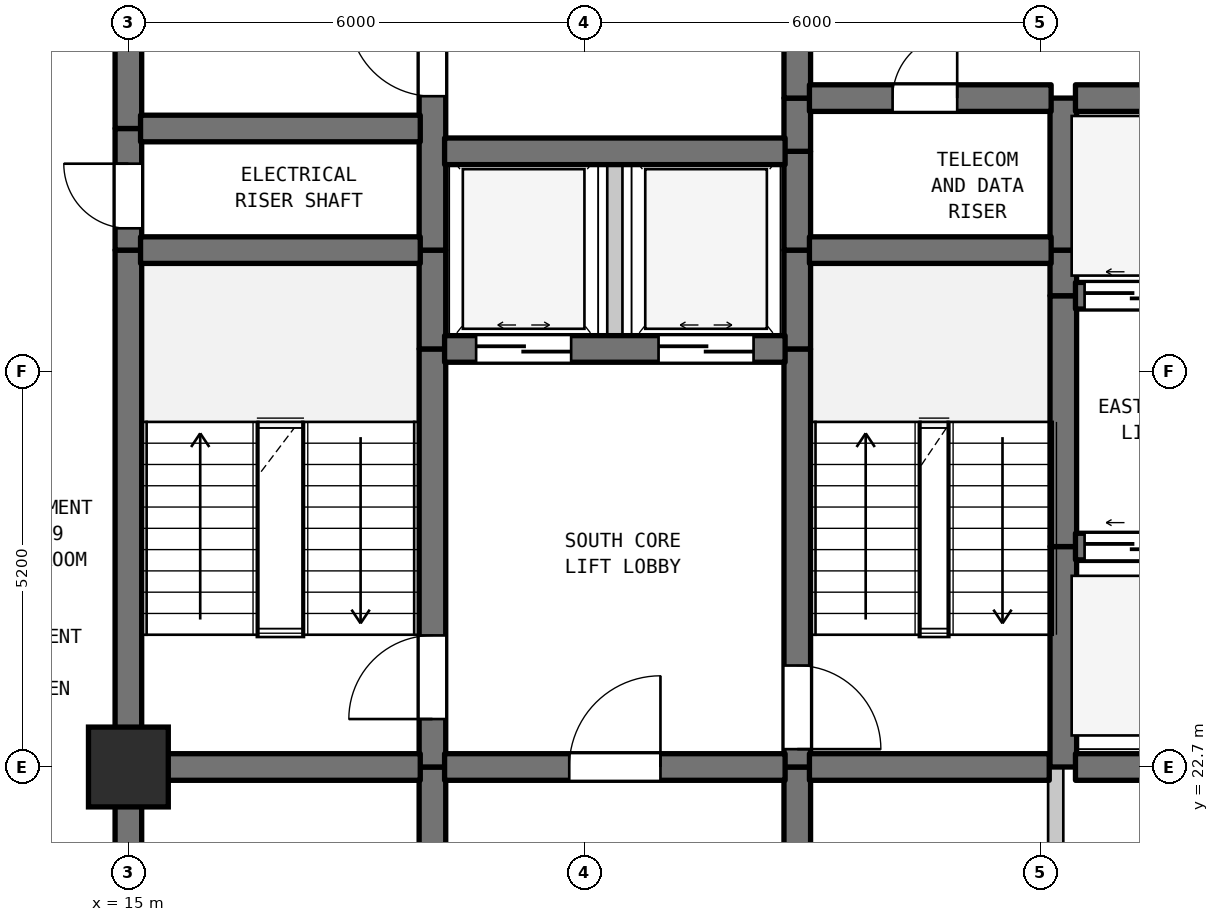
"""IFC4 building model, lengths in metres.
Left out: names, types, materials, properties, quantities, classifications, styles, units other than length and angle.
Written with IfcOpenShell. Run it as: python <this file> out.ifc"""

import sys

from ifc_helpers import new_model, si_unit, direction, frame, frame_2d, origin, origin_2d, place, context, subcontext, project, spatial, rectangle, extrude, element, fill, save


model = new_model("IFC4")
c1 = context("Model", 3, precision=1e-05, world=origin(), true_north=direction((0.0, 1.0)))
c2 = subcontext(c1, "Body", "Model", "MODEL_VIEW")
j1 = project(units=[si_unit("LENGTHUNIT", "METRE"), si_unit("PLANEANGLEUNIT", "RADIAN")], contexts=[c1])
p1 = place(None, origin())
s1 = spatial("IfcSite", under=j1, at=p1, CompositionType="ELEMENT")
p2 = place(p1, origin())
s2 = spatial("IfcBuilding", under=s1, at=p2, CompositionType="ELEMENT")
p3 = place(p2, frame((0.0, 0.0, 113.1)))
s3 = spatial("IfcBuildingStorey", under=s2, at=p3, CompositionType="ELEMENT", Elevation=113.1)
p4 = place(p3, frame((15.0, 22.7, 0.0), z_axis=(0.0, 0.0, 1.0), x_axis=(1.0, 0.0, 0.0)))
e1 = element("IfcColumn", 1, at=p4, inside=s3, PredefinedType="COLUMN", context=c2, shape_type="SweptSolid", body=[
    extrude(rectangle(XDim=1.05, YDim=1.05, at=origin_2d()), origin(), (0.0, 0.0, 1.0), 3.7),
])
p5 = place(p3, frame((15.0, 19.5, 0.0), z_axis=(0.0, 0.0, 1.0), x_axis=(0.0, 1.0, 0.0)))
e2 = element("IfcWall", 2, at=p5, inside=s3, PredefinedType="SHEAR", context=c2, shape_type="SweptSolid", body=[
    extrude(rectangle(XDim=3.2, YDim=0.35, at=frame_2d((1.6, 0.0))), origin(), (0.0, 0.0, 1.0), 3.385),
])
p6 = place(p3, frame((15.0, 22.7, 0.0), z_axis=(0.0, 0.0, 1.0), x_axis=(0.0, 1.0, 0.0)))
e3 = element("IfcWall", 3, at=p6, inside=s3, PredefinedType="SHEAR", context=c2, shape_type="SweptSolid", body=[
    extrude(rectangle(XDim=6.8, YDim=0.35, at=frame_2d((3.4, 0.0))), origin(), (0.0, 0.0, 1.0), 3.385),
])
p7 = place(p3, frame((15.0, 29.5, 0.0), z_axis=(0.0, 0.0, 1.0), x_axis=(0.0, 1.0, 0.0)))
e4 = element("IfcWall", 4, at=p7, inside=s3, PredefinedType="SHEAR", context=c2, shape_type="SweptSolid", body=[
    extrude(rectangle(XDim=1.6, YDim=0.35, at=frame_2d((0.8, 0.0))), origin(), (0.0, 0.0, 1.0), 3.385),
])
p8 = place(p7, frame((0.287, 0.0, 0.0)))
e5 = element("IfcOpeningElement", 5, at=p8, cuts=e4, PredefinedType="OPENING", context=c2, shape_type="SweptSolid", body=[
    extrude(rectangle(XDim=0.85, YDim=2.1, at=frame_2d((0.425, 1.05))), frame((0.0, 0.185, 0.0), z_axis=(0.0, -1.0, 0.0), x_axis=(1.0, 0.0, 0.0)), (0.0, 0.0, 1.0), 0.37),
])
p9 = place(p3, frame((15.0, 31.1, 0.0), z_axis=(0.0, 0.0, 1.0), x_axis=(0.0, 1.0, 0.0)))
e6 = element("IfcWall", 6, at=p9, inside=s3, PredefinedType="SHEAR", context=c2, shape_type="SweptSolid", body=[
    extrude(rectangle(XDim=6.8, YDim=0.35, at=frame_2d((3.4, 0.0))), origin(), (0.0, 0.0, 1.0), 3.385),
])
p10 = place(p3, frame((19.0, 19.5, 0.0), z_axis=(0.0, 0.0, 1.0), x_axis=(0.0, 1.0, 0.0)))
e7 = element("IfcWall", 7, at=p10, inside=s3, PredefinedType="SHEAR", context=c2, shape_type="SweptSolid", body=[
    extrude(rectangle(XDim=3.2, YDim=0.35, at=frame_2d((1.6, 0.0))), origin(), (0.0, 0.0, 1.0), 3.385),
])
p11 = place(p3, frame((19.0, 22.7, 0.0), z_axis=(0.0, 0.0, 1.0), x_axis=(0.0, 1.0, 0.0)))
e8 = element("IfcWall", 8, at=p11, inside=s3, PredefinedType="SHEAR", context=c2, shape_type="SweptSolid", body=[
    extrude(rectangle(XDim=5.5, YDim=0.35, at=frame_2d((2.75, 0.0))), origin(), (0.0, 0.0, 1.0), 3.385),
])
p12 = place(p11, frame((0.631, 0.0, 0.0)))
e9 = element("IfcOpeningElement", 9, at=p12, cuts=e8, PredefinedType="OPENING", context=c2, shape_type="SweptSolid", body=[
    extrude(rectangle(XDim=1.1, YDim=2.15, at=frame_2d((0.55, 1.075))), frame((0.0, 0.185, 0.0), z_axis=(0.0, -1.0, 0.0), x_axis=(1.0, 0.0, 0.0)), (0.0, 0.0, 1.0), 0.37),
])
p13 = place(p3, frame((19.0, 28.2, 0.0), z_axis=(0.0, 0.0, 1.0), x_axis=(0.0, 1.0, 0.0)))
e10 = element("IfcWall", 10, at=p13, inside=s3, PredefinedType="SHEAR", context=c2, shape_type="SweptSolid", body=[
    extrude(rectangle(XDim=1.3, YDim=0.35, at=frame_2d((0.65, 0.0))), origin(), (0.0, 0.0, 1.0), 3.385),
])
p14 = place(p3, frame((19.0, 29.5, 0.0), z_axis=(0.0, 0.0, 1.0), x_axis=(0.0, 1.0, 0.0)))
e11 = element("IfcWall", 11, at=p14, inside=s3, PredefinedType="SHEAR", context=c2, shape_type="SweptSolid", body=[
    extrude(rectangle(XDim=5.5, YDim=0.35, at=frame_2d((2.75, 0.0))), origin(), (0.0, 0.0, 1.0), 3.385),
])
p15 = place(p14, frame((2.025, 0.0, 0.0)))
e12 = element("IfcOpeningElement", 12, at=p15, cuts=e11, PredefinedType="OPENING", context=c2, shape_type="SweptSolid", body=[
    extrude(rectangle(XDim=1.1, YDim=2.15, at=frame_2d((0.55, 1.075))), frame((0.0, 0.185, 0.0), z_axis=(0.0, -1.0, 0.0), x_axis=(1.0, 0.0, 0.0)), (0.0, 0.0, 1.0), 0.37),
])
p16 = place(p3, frame((21.4, 28.2, 0.0), z_axis=(0.0, 0.0, 1.0), x_axis=(0.0, 1.0, 0.0)))
e13 = element("IfcWall", 13, at=p16, inside=s3, PredefinedType="STANDARD", context=c2, shape_type="SweptSolid", body=[
    extrude(rectangle(XDim=2.6, YDim=0.2, at=frame_2d((1.3, 0.0))), origin(), (0.0, 0.0, 1.0), 3.385),
])
p17 = place(p3, frame((23.8, 19.5, 0.0), z_axis=(0.0, 0.0, 1.0), x_axis=(0.0, 1.0, 0.0)))
e14 = element("IfcWall", 14, at=p17, inside=s3, PredefinedType="SHEAR", context=c2, shape_type="SweptSolid", body=[
    extrude(rectangle(XDim=3.2, YDim=0.35, at=frame_2d((1.6, 0.0))), origin(), (0.0, 0.0, 1.0), 3.385),
])
p18 = place(p3, frame((23.8, 22.7, 0.0), z_axis=(0.0, 0.0, 1.0), x_axis=(0.0, 1.0, 0.0)))
e15 = element("IfcWall", 15, at=p18, inside=s3, PredefinedType="SHEAR", context=c2, shape_type="SweptSolid", body=[
    extrude(rectangle(XDim=5.5, YDim=0.35, at=frame_2d((2.75, 0.0))), origin(), (0.0, 0.0, 1.0), 3.385),
])
p19 = place(p18, frame((0.235, 0.0, 0.0)))
e16 = element("IfcOpeningElement", 16, at=p19, cuts=e15, PredefinedType="OPENING", context=c2, shape_type="SweptSolid", body=[
    extrude(rectangle(XDim=1.1, YDim=2.15, at=frame_2d((0.55, 1.075))), frame((0.0, 0.185, 0.0), z_axis=(0.0, -1.0, 0.0), x_axis=(1.0, 0.0, 0.0)), (0.0, 0.0, 1.0), 0.37),
])
for number, where, z_axis, x_axis in (
    (17, (23.8, 28.2, 0.0), (0.0, 0.0, 1.0), (0.0, 1.0, 0.0)),
    (18, (23.8, 29.5, 0.0), (0.0, 0.0, 1.0), (0.0, 1.0, 0.0)),
):
    element("IfcWall", number, at=place(p3, frame(where, z_axis=z_axis, x_axis=x_axis)), inside=s3, PredefinedType="SHEAR", context=c2, shape_type="SweptSolid", body=[
        extrude(rectangle(XDim=1.3, YDim=0.35, at=frame_2d((0.65, 0.0))), origin(), (0.0, 0.0, 1.0), 3.385),
    ])
p20 = place(p3, frame((23.8, 30.8, 0.0), z_axis=(0.0, 0.0, 1.0), x_axis=(0.0, 1.0, 0.0)))
e19 = element("IfcWall", 19, at=p20, inside=s3, PredefinedType="SHEAR", context=c2, shape_type="SweptSolid", body=[
    extrude(rectangle(XDim=0.7, YDim=0.35, at=frame_2d((0.35, 0.0))), origin(), (0.0, 0.0, 1.0), 3.385),
])
p21 = place(p3, frame((23.8, 31.5, 0.0), z_axis=(0.0, 0.0, 1.0), x_axis=(0.0, 1.0, 0.0)))
e20 = element("IfcWall", 20, at=p21, inside=s3, PredefinedType="SHEAR", context=c2, shape_type="SweptSolid", body=[
    extrude(rectangle(XDim=3.5, YDim=0.35, at=frame_2d((1.75, 0.0))), origin(), (0.0, 0.0, 1.0), 3.385),
])
p22 = place(p21, frame((1.127, 0.0, 0.0)))
e21 = element("IfcOpeningElement", 21, at=p22, cuts=e20, PredefinedType="OPENING", context=c2, shape_type="SweptSolid", body=[
    extrude(rectangle(XDim=1.1, YDim=2.15, at=frame_2d((0.55, 1.075))), frame((0.0, 0.185, 0.0), z_axis=(0.0, -1.0, 0.0), x_axis=(1.0, 0.0, 0.0)), (0.0, 0.0, 1.0), 0.37),
])
p23 = place(p3, frame((27.2, 21.1, 0.0), z_axis=(0.0, 0.0, 1.0), x_axis=(0.0, 1.0, 0.0)))
e22 = element("IfcWall", 22, at=p23, inside=s3, PredefinedType="STANDARD", context=c2, shape_type="SweptSolid", body=[
    extrude(rectangle(XDim=1.6, YDim=0.2, at=frame_2d((0.8, 0.0))), origin(), (0.0, 0.0, 1.0), 3.385),
])
p24 = place(p3, frame((27.3, 22.7, 0.0), z_axis=(0.0, 0.0, 1.0), x_axis=(0.0, 1.0, 0.0)))
e23 = element("IfcWall", 23, at=p24, inside=s3, PredefinedType="SHEAR", context=c2, shape_type="SweptSolid", body=[
    extrude(rectangle(XDim=2.9, YDim=0.35, at=frame_2d((1.45, 0.0))), origin(), (0.0, 0.0, 1.0), 3.385),
])
p25 = place(p3, frame((27.3, 25.6, 0.0), z_axis=(0.0, 0.0, 1.0), x_axis=(0.0, 1.0, 0.0)))
e24 = element("IfcWall", 24, at=p25, inside=s3, PredefinedType="SHEAR", context=c2, shape_type="SweptSolid", body=[
    extrude(rectangle(XDim=3.3, YDim=0.35, at=frame_2d((1.65, 0.0))), origin(), (0.0, 0.0, 1.0), 3.385),
])
p26 = place(p3, frame((27.3, 28.9, 0.0), z_axis=(0.0, 0.0, 1.0), x_axis=(0.0, 1.0, 0.0)))
e25 = element("IfcWall", 25, at=p26, inside=s3, PredefinedType="SHEAR", context=c2, shape_type="SweptSolid", body=[
    extrude(rectangle(XDim=0.6, YDim=0.35, at=frame_2d((0.3, 0.0))), origin(), (0.0, 0.0, 1.0), 3.385),
])
p27 = place(p3, frame((27.3, 29.5, 0.0), z_axis=(0.0, 0.0, 1.0), x_axis=(0.0, 1.0, 0.0)))
e26 = element("IfcWall", 26, at=p27, inside=s3, PredefinedType="SHEAR", context=c2, shape_type="SweptSolid", body=[
    extrude(rectangle(XDim=2.0, YDim=0.35, at=frame_2d((1.0, 0.0))), origin(), (0.0, 0.0, 1.0), 3.385),
])
p28 = place(p3, frame((15.16, 22.7, 0.0), z_axis=(0.0, 0.0, 1.0), x_axis=(1.0, 0.0, 0.0)))
e27 = element("IfcWall", 27, at=p28, inside=s3, PredefinedType="SHEAR", context=c2, shape_type="SweptSolid", body=[
    extrude(rectangle(XDim=3.68, YDim=0.35, at=frame_2d((1.84, 0.0))), origin(), (0.0, 0.0, 1.0), 3.385),
])
p29 = place(p3, frame((19.16, 22.7, 0.0), z_axis=(0.0, 0.0, 1.0), x_axis=(1.0, 0.0, 0.0)))
e28 = element("IfcWall", 28, at=p29, inside=s3, PredefinedType="SHEAR", context=c2, shape_type="SweptSolid", body=[
    extrude(rectangle(XDim=4.48, YDim=0.35, at=frame_2d((2.24, 0.0))), origin(), (0.0, 0.0, 1.0), 3.385),
])
p30 = place(p29, frame((1.64, 0.0, 0.0)))
e29 = element("IfcOpeningElement", 29, at=p30, cuts=e28, PredefinedType="OPENING", context=c2, shape_type="SweptSolid", body=[
    extrude(rectangle(XDim=1.2, YDim=2.2, at=frame_2d((0.6, 1.1))), frame((0.0, 0.185, 0.0), z_axis=(0.0, -1.0, 0.0), x_axis=(1.0, 0.0, 0.0)), (0.0, 0.0, 1.0), 0.37),
])
p31 = place(p3, frame((23.96, 22.7, 0.0), z_axis=(0.0, 0.0, 1.0), x_axis=(1.0, 0.0, 0.0)))
e30 = element("IfcWall", 30, at=p31, inside=s3, PredefinedType="SHEAR", context=c2, shape_type="SweptSolid", body=[
    extrude(rectangle(XDim=3.155, YDim=0.35, at=frame_2d((1.578, 0.0))), origin(), (0.0, 0.0, 1.0), 3.385),
])
p32 = place(p3, frame((27.46, 22.7, 0.0), z_axis=(0.0, 0.0, 1.0), x_axis=(1.0, 0.0, 0.0)))
e31 = element("IfcWall", 31, at=p32, inside=s3, PredefinedType="SHEAR", context=c2, shape_type="SweptSolid", body=[
    extrude(rectangle(XDim=3.18, YDim=0.35, at=frame_2d((1.59, 0.0))), origin(), (0.0, 0.0, 1.0), 3.385),
])
p33 = place(p3, frame((27.46, 25.6, 0.0), z_axis=(0.0, 0.0, 1.0), x_axis=(1.0, 0.0, 0.0)))
e32 = element("IfcWall", 32, at=p33, inside=s3, PredefinedType="SHEAR", context=c2, shape_type="SweptSolid", body=[
    extrude(rectangle(XDim=3.18, YDim=0.35, at=frame_2d((1.59, 0.0))), origin(), (0.0, 0.0, 1.0), 3.385),
])
p34 = place(p33, frame((0.12, 0.0, 0.0)))
e33 = element("IfcOpeningElement", 33, at=p34, cuts=e32, PredefinedType="OPENING", context=c2, shape_type="SweptSolid", body=[
    extrude(rectangle(XDim=1.25, YDim=2.2, at=frame_2d((0.625, 1.1))), frame((0.0, 0.185, 0.0), z_axis=(0.0, -1.0, 0.0), x_axis=(1.0, 0.0, 0.0)), (0.0, 0.0, 1.0), 0.37),
])
p35 = place(p33, frame((1.81, 0.0, 0.0)))
e34 = element("IfcOpeningElement", 34, at=p35, cuts=e32, PredefinedType="OPENING", context=c2, shape_type="SweptSolid", body=[
    extrude(rectangle(XDim=1.25, YDim=2.2, at=frame_2d((0.625, 1.1))), frame((0.0, 0.185, 0.0), z_axis=(0.0, -1.0, 0.0), x_axis=(1.0, 0.0, 0.0)), (0.0, 0.0, 1.0), 0.37),
])
p36 = place(p3, frame((19.16, 28.2, 0.0), z_axis=(0.0, 0.0, 1.0), x_axis=(1.0, 0.0, 0.0)))
e35 = element("IfcWall", 35, at=p36, inside=s3, PredefinedType="SHEAR", context=c2, shape_type="SweptSolid", body=[
    extrude(rectangle(XDim=4.48, YDim=0.35, at=frame_2d((2.24, 0.0))), origin(), (0.0, 0.0, 1.0), 3.385),
])
p37 = place(p36, frame((0.415, 0.0, 0.0)))
e36 = element("IfcOpeningElement", 36, at=p37, cuts=e35, PredefinedType="OPENING", context=c2, shape_type="SweptSolid", body=[
    extrude(rectangle(XDim=1.25, YDim=2.2, at=frame_2d((0.625, 1.1))), frame((0.0, 0.185, 0.0), z_axis=(0.0, -1.0, 0.0), x_axis=(1.0, 0.0, 0.0)), (0.0, 0.0, 1.0), 0.37),
])
p38 = place(p36, frame((2.815, 0.0, 0.0)))
e37 = element("IfcOpeningElement", 37, at=p38, cuts=e35, PredefinedType="OPENING", context=c2, shape_type="SweptSolid", body=[
    extrude(rectangle(XDim=1.25, YDim=2.2, at=frame_2d((0.625, 1.1))), frame((0.0, 0.185, 0.0), z_axis=(0.0, -1.0, 0.0), x_axis=(1.0, 0.0, 0.0)), (0.0, 0.0, 1.0), 0.37),
])
p39 = place(p3, frame((27.46, 28.9, 0.0), z_axis=(0.0, 0.0, 1.0), x_axis=(1.0, 0.0, 0.0)))
e38 = element("IfcWall", 38, at=p39, inside=s3, PredefinedType="SHEAR", context=c2, shape_type="SweptSolid", body=[
    extrude(rectangle(XDim=3.18, YDim=0.35, at=frame_2d((1.59, 0.0))), origin(), (0.0, 0.0, 1.0), 3.385),
])
p40 = place(p39, frame((0.12, 0.0, 0.0)))
e39 = element("IfcOpeningElement", 39, at=p40, cuts=e38, PredefinedType="OPENING", context=c2, shape_type="SweptSolid", body=[
    extrude(rectangle(XDim=1.25, YDim=2.2, at=frame_2d((0.625, 1.1))), frame((0.0, 0.185, 0.0), z_axis=(0.0, -1.0, 0.0), x_axis=(1.0, 0.0, 0.0)), (0.0, 0.0, 1.0), 0.37),
])
p41 = place(p39, frame((1.81, 0.0, 0.0)))
e40 = element("IfcOpeningElement", 40, at=p41, cuts=e38, PredefinedType="OPENING", context=c2, shape_type="SweptSolid", body=[
    extrude(rectangle(XDim=1.25, YDim=2.2, at=frame_2d((0.625, 1.1))), frame((0.0, 0.185, 0.0), z_axis=(0.0, -1.0, 0.0), x_axis=(1.0, 0.0, 0.0)), (0.0, 0.0, 1.0), 0.37),
])
p42 = place(p3, frame((15.16, 29.5, 0.0), z_axis=(0.0, 0.0, 1.0), x_axis=(1.0, 0.0, 0.0)))
e41 = element("IfcWall", 41, at=p42, inside=s3, PredefinedType="SHEAR", context=c2, shape_type="SweptSolid", body=[
    extrude(rectangle(XDim=3.68, YDim=0.35, at=frame_2d((1.84, 0.0))), origin(), (0.0, 0.0, 1.0), 3.385),
])
p43 = place(p3, frame((23.96, 29.5, 0.0), z_axis=(0.0, 0.0, 1.0), x_axis=(1.0, 0.0, 0.0)))
e42 = element("IfcWall", 42, at=p43, inside=s3, PredefinedType="SHEAR", context=c2, shape_type="SweptSolid", body=[
    extrude(rectangle(XDim=3.18, YDim=0.35, at=frame_2d((1.59, 0.0))), origin(), (0.0, 0.0, 1.0), 3.385),
])
p44 = place(p3, frame((19.16, 30.8, 0.0), z_axis=(0.0, 0.0, 1.0), x_axis=(1.0, 0.0, 0.0)))
e43 = element("IfcWall", 43, at=p44, inside=s3, PredefinedType="SHEAR", context=c2, shape_type="SweptSolid", body=[
    extrude(rectangle(XDim=4.48, YDim=0.35, at=frame_2d((2.24, 0.0))), origin(), (0.0, 0.0, 1.0), 3.385),
])
p45 = place(p3, frame((15.16, 31.1, 0.0), z_axis=(0.0, 0.0, 1.0), x_axis=(1.0, 0.0, 0.0)))
e44 = element("IfcWall", 44, at=p45, inside=s3, PredefinedType="SHEAR", context=c2, shape_type="SweptSolid", body=[
    extrude(rectangle(XDim=3.68, YDim=0.35, at=frame_2d((1.84, 0.0))), origin(), (0.0, 0.0, 1.0), 3.385),
])
p46 = place(p3, frame((23.96, 31.5, 0.0), z_axis=(0.0, 0.0, 1.0), x_axis=(1.0, 0.0, 0.0)))
e45 = element("IfcWall", 45, at=p46, inside=s3, PredefinedType="SHEAR", context=c2, shape_type="SweptSolid", body=[
    extrude(rectangle(XDim=3.18, YDim=0.35, at=frame_2d((1.59, 0.0))), origin(), (0.0, 0.0, 1.0), 3.385),
])
p47 = place(p46, frame((1.094, 0.0, 0.0)))
e46 = element("IfcOpeningElement", 46, at=p47, cuts=e45, PredefinedType="OPENING", context=c2, shape_type="SweptSolid", body=[
    extrude(rectangle(XDim=0.85, YDim=2.1, at=frame_2d((0.425, 1.05))), frame((0.0, 0.185, 0.0), z_axis=(0.0, -1.0, 0.0), x_axis=(1.0, 0.0, 0.0)), (0.0, 0.0, 1.0), 0.37),
])
p48 = place(p3, frame((27.46, 31.5, 0.0), z_axis=(0.0, 0.0, 1.0), x_axis=(1.0, 0.0, 0.0)))
e47 = element("IfcWall", 47, at=p48, inside=s3, PredefinedType="SHEAR", context=c2, shape_type="SweptSolid", body=[
    extrude(rectangle(XDim=3.18, YDim=0.35, at=frame_2d((1.59, 0.0))), origin(), (0.0, 0.0, 1.0), 3.385),
])
p49 = place(p8, origin())
e48 = element("IfcDoor", 48, at=p49, inside=s3, OperationType="SINGLE_SWING_RIGHT", PredefinedType="DOOR", context=c2, shape_type="SweptSolid", body=[
    extrude(rectangle(XDim=0.85, YDim=2.1, at=frame_2d((0.425, 1.05))), frame((0.0, 0.025, 0.0), z_axis=(0.0, -1.0, 0.0), x_axis=(1.0, 0.0, 0.0)), (0.0, 0.0, 1.0), 0.05),
])
fill(e5, e48)
p50 = place(p12, origin())
e49 = element("IfcDoor", 49, at=p50, inside=s3, OperationType="SINGLE_SWING_LEFT", PredefinedType="DOOR", context=c2, shape_type="SweptSolid", body=[
    extrude(rectangle(XDim=1.1, YDim=2.15, at=frame_2d((0.55, 1.075))), frame((0.0, 0.025, 0.0), z_axis=(0.0, -1.0, 0.0), x_axis=(1.0, 0.0, 0.0)), (0.0, 0.0, 1.0), 0.05),
])
fill(e9, e49)
p51 = place(p15, origin())
e50 = element("IfcDoor", 50, at=p51, inside=s3, OperationType="SINGLE_SWING_RIGHT", PredefinedType="DOOR", context=c2, shape_type="SweptSolid", body=[
    extrude(rectangle(XDim=1.1, YDim=2.15, at=frame_2d((0.55, 1.075))), frame((0.0, 0.025, 0.0), z_axis=(0.0, -1.0, 0.0), x_axis=(1.0, 0.0, 0.0)), (0.0, 0.0, 1.0), 0.05),
])
fill(e12, e50)
p52 = place(p19, frame((1.1, 0.0, 0.0), z_axis=(0.0, 0.0, 1.0), x_axis=(-1.0, 0.0, 0.0)))
e51 = element("IfcDoor", 51, at=p52, inside=s3, OperationType="SINGLE_SWING_LEFT", PredefinedType="DOOR", context=c2, shape_type="SweptSolid", body=[
    extrude(rectangle(XDim=1.1, YDim=2.15, at=frame_2d((0.55, 1.075))), frame((0.0, 0.025, 0.0), z_axis=(0.0, -1.0, 0.0), x_axis=(1.0, 0.0, 0.0)), (0.0, 0.0, 1.0), 0.05),
])
fill(e16, e51)
p53 = place(p30, origin())
e52 = element("IfcDoor", 52, at=p53, inside=s3, OperationType="SINGLE_SWING_RIGHT", PredefinedType="DOOR", context=c2, shape_type="SweptSolid", body=[
    extrude(rectangle(XDim=1.2, YDim=2.2, at=frame_2d((0.6, 1.1))), frame((0.0, 0.025, 0.0), z_axis=(0.0, -1.0, 0.0), x_axis=(1.0, 0.0, 0.0)), (0.0, 0.0, 1.0), 0.05),
])
fill(e29, e52)
p54 = place(p34, origin())
e53 = element("IfcDoor", 53, at=p54, inside=s3, OperationType="DOUBLE_DOOR_SLIDING", PredefinedType="DOOR", context=c2, shape_type="SweptSolid", body=[
    extrude(rectangle(XDim=1.25, YDim=2.2, at=frame_2d((0.625, 1.1))), frame((0.0, 0.025, 0.0), z_axis=(0.0, -1.0, 0.0), x_axis=(1.0, 0.0, 0.0)), (0.0, 0.0, 1.0), 0.05),
])
fill(e33, e53)
p55 = place(p37, origin())
e54 = element("IfcDoor", 54, at=p55, inside=s3, OperationType="DOUBLE_DOOR_SLIDING", PredefinedType="DOOR", context=c2, shape_type="SweptSolid", body=[
    extrude(rectangle(XDim=1.25, YDim=2.2, at=frame_2d((0.625, 1.1))), frame((0.0, 0.025, 0.0), z_axis=(0.0, -1.0, 0.0), x_axis=(1.0, 0.0, 0.0)), (0.0, 0.0, 1.0), 0.05),
])
fill(e36, e54)
p56 = place(p38, origin())
e55 = element("IfcDoor", 55, at=p56, inside=s3, OperationType="DOUBLE_DOOR_SLIDING", PredefinedType="DOOR", context=c2, shape_type="SweptSolid", body=[
    extrude(rectangle(XDim=1.25, YDim=2.2, at=frame_2d((0.625, 1.1))), frame((0.0, 0.025, 0.0), z_axis=(0.0, -1.0, 0.0), x_axis=(1.0, 0.0, 0.0)), (0.0, 0.0, 1.0), 0.05),
])
fill(e37, e55)
p57 = place(p40, origin())
e56 = element("IfcDoor", 56, at=p57, inside=s3, OperationType="DOUBLE_DOOR_SLIDING", PredefinedType="DOOR", context=c2, shape_type="SweptSolid", body=[
    extrude(rectangle(XDim=1.25, YDim=2.2, at=frame_2d((0.625, 1.1))), frame((0.0, 0.025, 0.0), z_axis=(0.0, -1.0, 0.0), x_axis=(1.0, 0.0, 0.0)), (0.0, 0.0, 1.0), 0.05),
])
fill(e39, e56)
p58 = place(p47, origin())
e57 = element("IfcDoor", 57, at=p58, inside=s3, OperationType="SINGLE_SWING_RIGHT", PredefinedType="DOOR", context=c2, shape_type="SweptSolid", body=[
    extrude(rectangle(XDim=0.85, YDim=2.1, at=frame_2d((0.425, 1.05))), frame((0.0, 0.025, 0.0), z_axis=(0.0, -1.0, 0.0), x_axis=(1.0, 0.0, 0.0)), (0.0, 0.0, 1.0), 0.05),
])
fill(e46, e57)
save(model, sys.argv[1])
